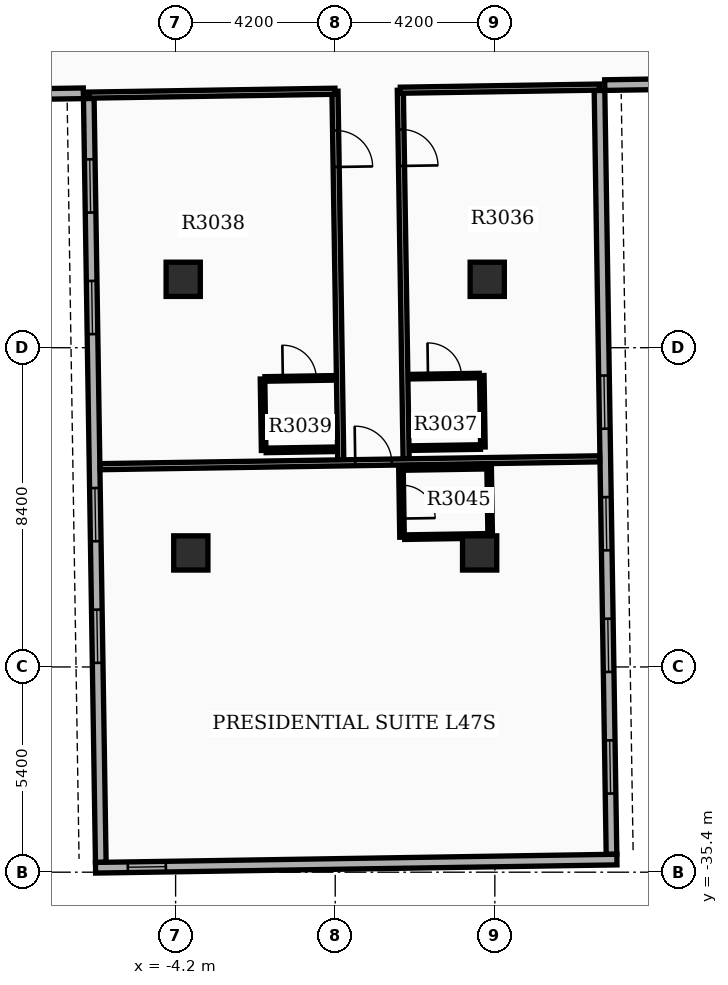
"""IFC4 building model, lengths in metres.
Left out: names, types, materials, properties, quantities, classifications, styles, units other than length and angle.
Written with IfcOpenShell. Run it as: python <this file> out.ifc"""

import sys

from ifc_helpers import new_model, si_unit, direction, frame, frame_2d, origin, origin_2d, place, context, subcontext, project, spatial, rectangle, extrude, element, fill, save


model = new_model("IFC4")
c1 = context("Model", 3, precision=1e-05, world=origin(), true_north=direction((0.0, 1.0)))
c2 = subcontext(c1, "Body", "Model", "MODEL_VIEW")
j1 = project(units=[si_unit("LENGTHUNIT", "METRE"), si_unit("PLANEANGLEUNIT", "RADIAN")], contexts=[c1])
p1 = place(None, origin())
s1 = spatial("IfcSite", under=j1, at=p1, CompositionType="ELEMENT")
p2 = place(p1, origin())
s2 = spatial("IfcBuilding", under=s1, at=p2, CompositionType="ELEMENT")
p3 = place(p2, frame((0.0, 0.0, 187.8)))
s3 = spatial("IfcBuildingStorey", under=s2, at=p3, CompositionType="ELEMENT", Elevation=187.8)
for number, where, z_axis, x_axis in (
    (1, (-4.0, -19.8, 0.0), (0.0, 0.0, 1.0), (1.0, 0.0, 0.0)),
    (2, (4.0, -19.8, 0.0), (0.0, 0.0, 1.0), (1.0, 0.0, 0.0)),
    (3, (-3.8, -27.0, 0.0), (0.0, 0.0, 1.0), (1.0, 0.0, 0.0)),
    (4, (3.8, -27.0, 0.0), (0.0, 0.0, 1.0), (1.0, 0.0, 0.0)),
):
    element("IfcColumn", number, at=place(p3, frame(where, z_axis=z_axis, x_axis=x_axis)), inside=s3, PredefinedType="COLUMN", context=c2, shape_type="SweptSolid", body=[
        extrude(rectangle(XDim=0.9, YDim=0.9, at=origin_2d()), origin(), (0.0, 0.0, 1.0), 3.9),
    ])
p4 = place(p3, frame((-6.485, -15.044, 0.0), z_axis=(0.0, 0.0, 1.0), x_axis=(0.01571739401, -0.999876474133, 0.0)))
e5 = element("IfcWall", 5, at=p4, inside=s3, PredefinedType="STANDARD", context=c2, shape_type="SweptSolid", body=[
    extrude(rectangle(XDim=20.1, YDim=0.28, at=frame_2d((10.05, 0.0))), origin(), (0.0, 0.0, 1.0), 2.92),
])
p5 = place(p4, frame((1.6, 0.0, 0.8)))
e6 = element("IfcOpeningElement", 6, at=p5, cuts=e5, PredefinedType="OPENING", context=c2, shape_type="SweptSolid", body=[
    extrude(rectangle(XDim=1.4, YDim=1.6, at=frame_2d((0.7, 0.8))), frame((0.0, 0.15, 0.0), z_axis=(0.0, -1.0, 0.0), x_axis=(1.0, 0.0, 0.0)), (0.0, 0.0, 1.0), 0.3),
])
p6 = place(p4, frame((4.8, 0.0, 0.8)))
e7 = element("IfcOpeningElement", 7, at=p6, cuts=e5, PredefinedType="OPENING", context=c2, shape_type="SweptSolid", body=[
    extrude(rectangle(XDim=1.4, YDim=1.6, at=frame_2d((0.7, 0.8))), frame((0.0, 0.15, 0.0), z_axis=(0.0, -1.0, 0.0), x_axis=(1.0, 0.0, 0.0)), (0.0, 0.0, 1.0), 0.3),
])
p7 = place(p4, frame((10.25, 0.0, 0.8)))
e8 = element("IfcOpeningElement", 8, at=p7, cuts=e5, PredefinedType="OPENING", context=c2, shape_type="SweptSolid", body=[
    extrude(rectangle(XDim=1.4, YDim=1.6, at=frame_2d((0.7, 0.8))), frame((0.0, 0.15, 0.0), z_axis=(0.0, -1.0, 0.0), x_axis=(1.0, 0.0, 0.0)), (0.0, 0.0, 1.0), 0.3),
])
p8 = place(p4, frame((13.45, 0.0, 0.8)))
e9 = element("IfcOpeningElement", 9, at=p8, cuts=e5, PredefinedType="OPENING", context=c2, shape_type="SweptSolid", body=[
    extrude(rectangle(XDim=1.4, YDim=1.6, at=frame_2d((0.7, 0.8))), frame((0.0, 0.15, 0.0), z_axis=(0.0, -1.0, 0.0), x_axis=(1.0, 0.0, 0.0)), (0.0, 0.0, 1.0), 0.3),
])
p9 = place(p3, frame((7.27, -34.93, 0.0), z_axis=(0.0, 0.0, 1.0), x_axis=(-0.015705059908, 0.999876667941, 0.0)))
e10 = element("IfcWall", 10, at=p9, inside=s3, PredefinedType="STANDARD", context=c2, shape_type="SweptSolid", body=[
    extrude(rectangle(XDim=20.1, YDim=0.28, at=frame_2d((10.05, 0.0))), origin(), (0.0, 0.0, 1.0), 2.92),
])
p10 = place(p9, frame((1.6, 0.0, 0.8)))
e11 = element("IfcOpeningElement", 11, at=p10, cuts=e10, PredefinedType="OPENING", context=c2, shape_type="SweptSolid", body=[
    extrude(rectangle(XDim=1.4, YDim=1.6, at=frame_2d((0.7, 0.8))), frame((0.0, 0.15, 0.0), z_axis=(0.0, -1.0, 0.0), x_axis=(1.0, 0.0, 0.0)), (0.0, 0.0, 1.0), 0.3),
])
p11 = place(p9, frame((4.8, 0.0, 0.8)))
e12 = element("IfcOpeningElement", 12, at=p11, cuts=e10, PredefinedType="OPENING", context=c2, shape_type="SweptSolid", body=[
    extrude(rectangle(XDim=1.4, YDim=1.6, at=frame_2d((0.7, 0.8))), frame((0.0, 0.15, 0.0), z_axis=(0.0, -1.0, 0.0), x_axis=(1.0, 0.0, 0.0)), (0.0, 0.0, 1.0), 0.3),
])
p12 = place(p9, frame((8.0, 0.0, 0.8)))
e13 = element("IfcOpeningElement", 13, at=p12, cuts=e10, PredefinedType="OPENING", context=c2, shape_type="SweptSolid", body=[
    extrude(rectangle(XDim=1.4, YDim=1.6, at=frame_2d((0.7, 0.8))), frame((0.0, 0.15, 0.0), z_axis=(0.0, -1.0, 0.0), x_axis=(1.0, 0.0, 0.0)), (0.0, 0.0, 1.0), 0.3),
])
p13 = place(p9, frame((11.2, 0.0, 0.8)))
e14 = element("IfcOpeningElement", 14, at=p13, cuts=e10, PredefinedType="OPENING", context=c2, shape_type="SweptSolid", body=[
    extrude(rectangle(XDim=1.4, YDim=1.6, at=frame_2d((0.7, 0.8))), frame((0.0, 0.15, 0.0), z_axis=(0.0, -1.0, 0.0), x_axis=(1.0, 0.0, 0.0)), (0.0, 0.0, 1.0), 0.3),
])
p14 = place(p3, frame((-6.307, -35.283, 0.0), z_axis=(0.0, 0.0, 1.0), x_axis=(0.999876549481, 0.015712599986, 0.0)))
e15 = element("IfcWall", 15, at=p14, inside=s3, PredefinedType="STANDARD", context=c2, shape_type="SweptSolid", body=[
    extrude(rectangle(XDim=13.72, YDim=0.28, at=frame_2d((6.86, 0.0))), origin(), (0.0, 0.0, 1.0), 2.92),
])
p15 = place(p14, frame((0.85, 0.0, 0.85)))
e16 = element("IfcOpeningElement", 16, at=p15, cuts=e15, PredefinedType="OPENING", context=c2, shape_type="SweptSolid", body=[
    extrude(rectangle(XDim=1.0, YDim=1.5, at=frame_2d((0.5, 0.75))), frame((0.0, 0.15, 0.0), z_axis=(0.0, -1.0, 0.0), x_axis=(1.0, 0.0, 0.0)), (0.0, 0.0, 1.0), 0.3),
])
p16 = place(p3, frame((-12.926, -15.005, 0.0), z_axis=(0.0, 0.0, 1.0), x_axis=(0.999876823822, 0.015695132501, 0.0)))
e17 = element("IfcWall", 17, at=p16, inside=s3, PredefinedType="STANDARD", context=c2, shape_type="SweptSolid", body=[
    extrude(rectangle(XDim=6.3, YDim=0.28, at=frame_2d((3.15, 0.0))), origin(), (0.0, 0.0, 1.0), 2.92),
])
p17 = place(p3, frame((13.391, -14.592, 0.0), z_axis=(0.0, 0.0, 1.0), x_axis=(-0.999876833368, -0.015694524359, 0.0)))
e18 = element("IfcWall", 18, at=p17, inside=s3, PredefinedType="STANDARD", context=c2, shape_type="SweptSolid", body=[
    extrude(rectangle(XDim=6.3, YDim=0.28, at=frame_2d((3.15, 0.0))), origin(), (0.0, 0.0, 1.0), 2.92),
])
p18 = place(p3, frame((1.713, -14.825, 0.0), z_axis=(0.0, 0.0, 1.0), x_axis=(0.015705659641, -0.999876658521, 0.0)))
e19 = element("IfcWall", 19, at=p18, inside=s3, PredefinedType="PARTITIONING", context=c2, shape_type="SweptSolid", body=[
    extrude(rectangle(XDim=9.7, YDim=0.16, at=frame_2d((4.85, 0.0))), origin(), (0.0, 0.0, 1.0), 2.91),
])
p19 = place(p18, frame((1.033, 0.0, 0.0)))
e20 = element("IfcOpeningElement", 20, at=p19, cuts=e19, PredefinedType="OPENING", context=c2, shape_type="SweptSolid", body=[
    extrude(rectangle(XDim=0.96, YDim=2.15, at=frame_2d((0.48, 1.075))), frame((0.0, 0.09, 0.0), z_axis=(0.0, -1.0, 0.0), x_axis=(1.0, 0.0, 0.0)), (0.0, 0.0, 1.0), 0.18),
])
p20 = place(p3, frame((1.713, -14.825, 0.0), z_axis=(0.0, 0.0, 1.0), x_axis=(0.99987672073, 0.015701698737, 0.0)))
e21 = element("IfcWall", 21, at=p20, inside=s3, PredefinedType="PARTITIONING", context=c2, shape_type="SweptSolid", body=[
    extrude(rectangle(XDim=5.24, YDim=0.16, at=frame_2d((2.62, 0.0))), origin(), (0.0, 0.0, 1.0), 2.91),
])
p21 = place(p3, frame((1.971, -22.362, 0.0), z_axis=(0.0, 0.0, 1.0), x_axis=(0.999876836305, 0.015694337248, 0.0)))
e22 = element("IfcWall", 22, at=p21, inside=s3, PredefinedType="PARTITIONING", context=c2, shape_type="SweptSolid", body=[
    extrude(rectangle(XDim=1.82, YDim=0.12, at=frame_2d((0.91, 0.0))), origin(), (0.0, 0.0, 1.0), 2.91),
])
p22 = place(p21, frame((0.47, 0.0, 0.0)))
e23 = element("IfcOpeningElement", 23, at=p22, cuts=e22, PredefinedType="OPENING", context=c2, shape_type="SweptSolid", body=[
    extrude(rectangle(XDim=0.88, YDim=2.1, at=frame_2d((0.44, 1.05))), frame((0.0, 0.07, 0.0), z_axis=(0.0, -1.0, 0.0), x_axis=(1.0, 0.0, 0.0)), (0.0, 0.0, 1.0), 0.14),
])
p23 = place(p3, frame((2.001, -24.242, 0.0), z_axis=(0.0, 0.0, 1.0), x_axis=(0.999874722342, 0.015828443418, 0.0)))
e24 = element("IfcWall", 24, at=p23, inside=s3, PredefinedType="PARTITIONING", context=c2, shape_type="SweptSolid", body=[
    extrude(rectangle(XDim=1.82, YDim=0.12, at=frame_2d((0.91, 0.0))), origin(), (0.0, 0.0, 1.0), 2.91),
])
p24 = place(p3, frame((3.856, -22.332, 0.0), z_axis=(0.0, 0.0, 1.0), x_axis=(0.015714386166, -0.99987652141, 0.0)))
e25 = element("IfcWall", 25, at=p24, inside=s3, PredefinedType="PARTITIONING", context=c2, shape_type="SweptSolid", body=[
    extrude(rectangle(XDim=1.88, YDim=0.12, at=frame_2d((0.94, 0.0))), origin(), (0.0, 0.0, 1.0), 2.91),
])
p25 = place(p3, frame((-0.007, -14.852, 0.0), z_axis=(0.0, 0.0, 1.0), x_axis=(0.015680101899, -0.999877059645, 0.0)))
e26 = element("IfcWall", 26, at=p25, inside=s3, PredefinedType="PARTITIONING", context=c2, shape_type="SweptSolid", body=[
    extrude(rectangle(XDim=9.7, YDim=0.16, at=frame_2d((4.85, 0.0))), origin(), (0.0, 0.0, 1.0), 2.91),
])
p26 = place(p25, frame((1.033, 0.0, 0.0)))
e27 = element("IfcOpeningElement", 27, at=p26, cuts=e26, PredefinedType="OPENING", context=c2, shape_type="SweptSolid", body=[
    extrude(rectangle(XDim=0.96, YDim=2.15, at=frame_2d((0.48, 1.075))), frame((0.0, 0.09, 0.0), z_axis=(0.0, -1.0, 0.0), x_axis=(1.0, 0.0, 0.0)), (0.0, 0.0, 1.0), 0.18),
])
p27 = place(p3, frame((-0.007, -14.852, 0.0), z_axis=(0.0, 0.0, 1.0), x_axis=(-0.999876577995, -0.015710785373, 0.0)))
e28 = element("IfcWall", 28, at=p27, inside=s3, PredefinedType="PARTITIONING", context=c2, shape_type="SweptSolid", body=[
    extrude(rectangle(XDim=6.48, YDim=0.16, at=frame_2d((3.24, 0.0))), origin(), (0.0, 0.0, 1.0), 2.91),
])
p28 = place(p3, frame((-1.848, -22.422, 0.0), z_axis=(0.0, 0.0, 1.0), x_axis=(0.999876803258, 0.015696442504, 0.0)))
e29 = element("IfcWall", 29, at=p28, inside=s3, PredefinedType="PARTITIONING", context=c2, shape_type="SweptSolid", body=[
    extrude(rectangle(XDim=1.82, YDim=0.12, at=frame_2d((0.91, 0.0))), origin(), (0.0, 0.0, 1.0), 2.91),
])
p29 = place(p28, frame((0.47, 0.0, 0.0)))
e30 = element("IfcOpeningElement", 30, at=p29, cuts=e29, PredefinedType="OPENING", context=c2, shape_type="SweptSolid", body=[
    extrude(rectangle(XDim=0.88, YDim=2.1, at=frame_2d((0.44, 1.05))), frame((0.0, 0.07, 0.0), z_axis=(0.0, -1.0, 0.0), x_axis=(1.0, 0.0, 0.0)), (0.0, 0.0, 1.0), 0.14),
])
p30 = place(p3, frame((-1.819, -24.302, 0.0), z_axis=(0.0, 0.0, 1.0), x_axis=(0.999876836305, 0.015694337248, 0.0)))
e31 = element("IfcWall", 31, at=p30, inside=s3, PredefinedType="PARTITIONING", context=c2, shape_type="SweptSolid", body=[
    extrude(rectangle(XDim=1.82, YDim=0.12, at=frame_2d((0.91, 0.0))), origin(), (0.0, 0.0, 1.0), 2.91),
])
p31 = place(p3, frame((-1.913, -22.423, 0.0), z_axis=(0.0, 0.0, 1.0), x_axis=(0.015714386166, -0.99987652141, 0.0)))
e32 = element("IfcWall", 32, at=p31, inside=s3, PredefinedType="PARTITIONING", context=c2, shape_type="SweptSolid", body=[
    extrude(rectangle(XDim=1.88, YDim=0.12, at=frame_2d((0.94, 0.0))), origin(), (0.0, 0.0, 1.0), 2.91),
])
p32 = place(p3, frame((-6.184, -24.73, 0.0), z_axis=(0.0, 0.0, 1.0), x_axis=(0.999876528878, 0.015713911007, 0.0)))
e33 = element("IfcWall", 33, at=p32, inside=s3, PredefinedType="PARTITIONING", context=c2, shape_type="SweptSolid", body=[
    extrude(rectangle(XDim=13.144, YDim=0.16, at=frame_2d((6.572, 0.0))), origin(), (0.0, 0.0, 1.0), 2.91),
])
p33 = place(p32, frame((6.712, 0.0, 0.0)))
e34 = element("IfcOpeningElement", 34, at=p33, cuts=e33, PredefinedType="OPENING", context=c2, shape_type="SweptSolid", body=[
    extrude(rectangle(XDim=0.96, YDim=2.15, at=frame_2d((0.48, 1.075))), frame((0.0, 0.09, 0.0), z_axis=(0.0, -1.0, 0.0), x_axis=(1.0, 0.0, 0.0)), (0.0, 0.0, 1.0), 0.18),
])
p34 = place(p3, frame((1.729, -24.766, 0.0), z_axis=(0.0, 0.0, 1.0), x_axis=(0.015694337248, -0.999876836305, 0.0)))
e35 = element("IfcWall", 35, at=p34, inside=s3, PredefinedType="PARTITIONING", context=c2, shape_type="SweptSolid", body=[
    extrude(rectangle(XDim=1.82, YDim=0.12, at=frame_2d((0.91, 0.0))), origin(), (0.0, 0.0, 1.0), 2.91),
])
p35 = place(p34, frame((0.45, 0.0, 0.0)))
e36 = element("IfcOpeningElement", 36, at=p35, cuts=e35, PredefinedType="OPENING", context=c2, shape_type="SweptSolid", body=[
    extrude(rectangle(XDim=0.88, YDim=2.1, at=frame_2d((0.44, 1.05))), frame((0.0, 0.07, 0.0), z_axis=(0.0, -1.0, 0.0), x_axis=(1.0, 0.0, 0.0)), (0.0, 0.0, 1.0), 0.14),
])
p36 = place(p3, frame((4.049, -24.729, 0.0), z_axis=(0.0, 0.0, 1.0), x_axis=(0.015694337248, -0.999876836305, 0.0)))
e37 = element("IfcWall", 37, at=p36, inside=s3, PredefinedType="PARTITIONING", context=c2, shape_type="SweptSolid", body=[
    extrude(rectangle(XDim=1.82, YDim=0.12, at=frame_2d((0.91, 0.0))), origin(), (0.0, 0.0, 1.0), 2.91),
])
for number, where, z_axis, x_axis in (
    (38, (1.799, -24.765, 0.0), (0.0, 0.0, 1.0), (1.0, 0.016, 0.0)),
    (39, (1.828, -26.585, 0.0), (0.0, 0.0, 1.0), (1.0, 0.016, 0.0)),
):
    element("IfcWall", number, at=place(p3, frame(where, z_axis=z_axis, x_axis=x_axis)), inside=s3, PredefinedType="PARTITIONING", context=c2, shape_type="SweptSolid", body=[
        extrude(rectangle(XDim=2.18, YDim=0.12, at=frame_2d((1.09, 0.0))), origin(), (0.0, 0.0, 1.0), 2.91),
    ])
p37 = place(p5, origin())
e40 = element("IfcWindow", 40, at=p37, inside=s3, PartitioningType="SINGLE_PANEL", PredefinedType="WINDOW", context=c2, shape_type="SweptSolid", body=[
    extrude(rectangle(XDim=1.4, YDim=1.6, at=frame_2d((0.7, 0.8))), frame((0.0, 0.03, 0.0), z_axis=(0.0, -1.0, 0.0), x_axis=(1.0, 0.0, 0.0)), (0.0, 0.0, 1.0), 0.06),
])
fill(e6, e40)
p38 = place(p6, origin())
e41 = element("IfcWindow", 41, at=p38, inside=s3, PartitioningType="SINGLE_PANEL", PredefinedType="WINDOW", context=c2, shape_type="SweptSolid", body=[
    extrude(rectangle(XDim=1.4, YDim=1.6, at=frame_2d((0.7, 0.8))), frame((0.0, 0.03, 0.0), z_axis=(0.0, -1.0, 0.0), x_axis=(1.0, 0.0, 0.0)), (0.0, 0.0, 1.0), 0.06),
])
fill(e7, e41)
p39 = place(p7, origin())
e42 = element("IfcWindow", 42, at=p39, inside=s3, PartitioningType="SINGLE_PANEL", PredefinedType="WINDOW", context=c2, shape_type="SweptSolid", body=[
    extrude(rectangle(XDim=1.4, YDim=1.6, at=frame_2d((0.7, 0.8))), frame((0.0, 0.03, 0.0), z_axis=(0.0, -1.0, 0.0), x_axis=(1.0, 0.0, 0.0)), (0.0, 0.0, 1.0), 0.06),
])
fill(e8, e42)
p40 = place(p8, origin())
e43 = element("IfcWindow", 43, at=p40, inside=s3, PartitioningType="SINGLE_PANEL", PredefinedType="WINDOW", context=c2, shape_type="SweptSolid", body=[
    extrude(rectangle(XDim=1.4, YDim=1.6, at=frame_2d((0.7, 0.8))), frame((0.0, 0.03, 0.0), z_axis=(0.0, -1.0, 0.0), x_axis=(1.0, 0.0, 0.0)), (0.0, 0.0, 1.0), 0.06),
])
fill(e9, e43)
p41 = place(p10, origin())
e44 = element("IfcWindow", 44, at=p41, inside=s3, PartitioningType="SINGLE_PANEL", PredefinedType="WINDOW", context=c2, shape_type="SweptSolid", body=[
    extrude(rectangle(XDim=1.4, YDim=1.6, at=frame_2d((0.7, 0.8))), frame((0.0, 0.03, 0.0), z_axis=(0.0, -1.0, 0.0), x_axis=(1.0, 0.0, 0.0)), (0.0, 0.0, 1.0), 0.06),
])
fill(e11, e44)
p42 = place(p11, origin())
e45 = element("IfcWindow", 45, at=p42, inside=s3, PartitioningType="SINGLE_PANEL", PredefinedType="WINDOW", context=c2, shape_type="SweptSolid", body=[
    extrude(rectangle(XDim=1.4, YDim=1.6, at=frame_2d((0.7, 0.8))), frame((0.0, 0.03, 0.0), z_axis=(0.0, -1.0, 0.0), x_axis=(1.0, 0.0, 0.0)), (0.0, 0.0, 1.0), 0.06),
])
fill(e12, e45)
p43 = place(p12, origin())
e46 = element("IfcWindow", 46, at=p43, inside=s3, PartitioningType="SINGLE_PANEL", PredefinedType="WINDOW", context=c2, shape_type="SweptSolid", body=[
    extrude(rectangle(XDim=1.4, YDim=1.6, at=frame_2d((0.7, 0.8))), frame((0.0, 0.03, 0.0), z_axis=(0.0, -1.0, 0.0), x_axis=(1.0, 0.0, 0.0)), (0.0, 0.0, 1.0), 0.06),
])
fill(e13, e46)
p44 = place(p13, origin())
e47 = element("IfcWindow", 47, at=p44, inside=s3, PartitioningType="SINGLE_PANEL", PredefinedType="WINDOW", context=c2, shape_type="SweptSolid", body=[
    extrude(rectangle(XDim=1.4, YDim=1.6, at=frame_2d((0.7, 0.8))), frame((0.0, 0.03, 0.0), z_axis=(0.0, -1.0, 0.0), x_axis=(1.0, 0.0, 0.0)), (0.0, 0.0, 1.0), 0.06),
])
fill(e14, e47)
p45 = place(p15, origin())
e48 = element("IfcWindow", 48, at=p45, inside=s3, PartitioningType="SINGLE_PANEL", PredefinedType="WINDOW", context=c2, shape_type="SweptSolid", body=[
    extrude(rectangle(XDim=1.0, YDim=1.5, at=frame_2d((0.5, 0.75))), frame((0.0, 0.03, 0.0), z_axis=(0.0, -1.0, 0.0), x_axis=(1.0, 0.0, 0.0)), (0.0, 0.0, 1.0), 0.06),
])
fill(e16, e48)
p46 = place(p19, origin())
e49 = element("IfcDoor", 49, at=p46, inside=s3, OperationType="SINGLE_SWING_RIGHT", PredefinedType="DOOR", context=c2, shape_type="SweptSolid", body=[
    extrude(rectangle(XDim=0.96, YDim=2.15, at=frame_2d((0.48, 1.075))), frame((0.0, 0.025, 0.0), z_axis=(0.0, -1.0, 0.0), x_axis=(1.0, 0.0, 0.0)), (0.0, 0.0, 1.0), 0.05),
])
fill(e20, e49)
p47 = place(p22, origin())
e50 = element("IfcDoor", 50, at=p47, inside=s3, OperationType="SINGLE_SWING_LEFT", PredefinedType="DOOR", context=c2, shape_type="SweptSolid", body=[
    extrude(rectangle(XDim=0.88, YDim=2.1, at=frame_2d((0.44, 1.05))), frame((0.0, 0.025, 0.0), z_axis=(0.0, -1.0, 0.0), x_axis=(1.0, 0.0, 0.0)), (0.0, 0.0, 1.0), 0.05),
])
fill(e23, e50)
p48 = place(p26, origin())
e51 = element("IfcDoor", 51, at=p48, inside=s3, OperationType="SINGLE_SWING_RIGHT", PredefinedType="DOOR", context=c2, shape_type="SweptSolid", body=[
    extrude(rectangle(XDim=0.96, YDim=2.15, at=frame_2d((0.48, 1.075))), frame((0.0, 0.025, 0.0), z_axis=(0.0, -1.0, 0.0), x_axis=(1.0, 0.0, 0.0)), (0.0, 0.0, 1.0), 0.05),
])
fill(e27, e51)
p49 = place(p29, origin())
e52 = element("IfcDoor", 52, at=p49, inside=s3, OperationType="SINGLE_SWING_LEFT", PredefinedType="DOOR", context=c2, shape_type="SweptSolid", body=[
    extrude(rectangle(XDim=0.88, YDim=2.1, at=frame_2d((0.44, 1.05))), frame((0.0, 0.025, 0.0), z_axis=(0.0, -1.0, 0.0), x_axis=(1.0, 0.0, 0.0)), (0.0, 0.0, 1.0), 0.05),
])
fill(e30, e52)
p50 = place(p33, origin())
e53 = element("IfcDoor", 53, at=p50, inside=s3, OperationType="SINGLE_SWING_LEFT", PredefinedType="DOOR", context=c2, shape_type="SweptSolid", body=[
    extrude(rectangle(XDim=0.96, YDim=2.15, at=frame_2d((0.48, 1.075))), frame((0.0, 0.025, 0.0), z_axis=(0.0, -1.0, 0.0), x_axis=(1.0, 0.0, 0.0)), (0.0, 0.0, 1.0), 0.05),
])
fill(e34, e53)
p51 = place(p35, origin())
e54 = element("IfcDoor", 54, at=p51, inside=s3, OperationType="SINGLE_SWING_RIGHT", PredefinedType="DOOR", context=c2, shape_type="SweptSolid", body=[
    extrude(rectangle(XDim=0.88, YDim=2.1, at=frame_2d((0.44, 1.05))), frame((0.0, 0.025, 0.0), z_axis=(0.0, -1.0, 0.0), x_axis=(1.0, 0.0, 0.0)), (0.0, 0.0, 1.0), 0.05),
])
fill(e36, e54)
save(model, sys.argv[1])
